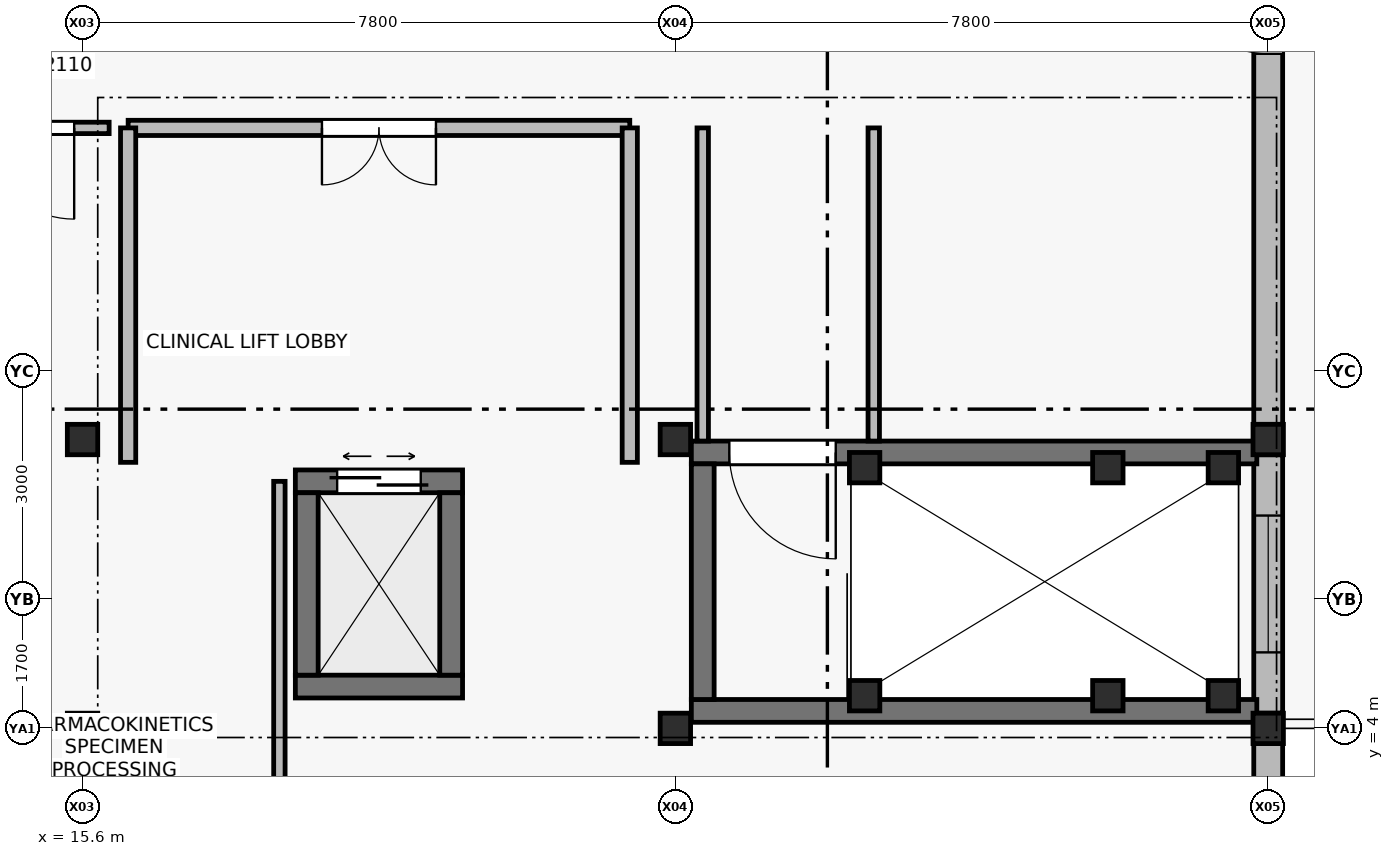
"""IFC4 building model, lengths in metres.
Left out: names, types, materials, properties, quantities, classifications, styles, units other than length and angle.
Written with IfcOpenShell. Run it as: python <this file> out.ifc"""

import sys

from ifc_helpers import new_model, si_unit, direction, frame, frame_2d, origin, origin_2d, place, context, subcontext, project, spatial, rectangle, extrude, element, fill, save


model = new_model("IFC4")
c1 = context("Model", 3, precision=1e-05, world=origin(), true_north=direction((0.0, 1.0)))
c2 = subcontext(c1, "Body", "Model", "MODEL_VIEW")
j1 = project(units=[si_unit("LENGTHUNIT", "METRE"), si_unit("PLANEANGLEUNIT", "RADIAN")], contexts=[c1])
p1 = place(None, origin())
s1 = spatial("IfcSite", under=j1, at=p1, CompositionType="ELEMENT")
p2 = place(p1, origin())
s2 = spatial("IfcBuilding", under=s1, at=p2, CompositionType="ELEMENT")
p3 = place(p2, frame((0.0, 0.0, 18.6)))
s3 = spatial("IfcBuildingStorey", under=s2, at=p3, CompositionType="ELEMENT", Elevation=18.6)
for number, where, z_axis, x_axis in (
    (1, (15.6, 4.0, 0.0), (0.0, 0.0, 1.0), (1.0, 0.0, 0.0)),
    (2, (15.6, 7.8, 0.0), (0.0, 0.0, 1.0), (1.0, 0.0, 0.0)),
    (3, (23.4, 4.0, 0.0), (0.0, 0.0, 1.0), (1.0, 0.0, 0.0)),
    (4, (23.4, 7.8, 0.0), (0.0, 0.0, 1.0), (1.0, 0.0, 0.0)),
    (5, (31.2, 4.0, 0.0), (0.0, 0.0, 1.0), (1.0, 0.0, 0.0)),
    (6, (31.2, 7.8, 0.0), (0.0, 0.0, 1.0), (1.0, 0.0, 0.0)),
    (7, (25.89, 4.43, 0.0), (0.0, 0.0, 1.0), (1.0, 0.0, 0.0)),
    (8, (25.89, 7.43, 0.0), (0.0, 0.0, 1.0), (1.0, 0.0, 0.0)),
    (9, (29.09, 4.43, 0.0), (0.0, 0.0, 1.0), (1.0, 0.0, 0.0)),
    (10, (29.09, 7.43, 0.0), (0.0, 0.0, 1.0), (1.0, 0.0, 0.0)),
    (11, (30.61, 4.43, 0.0), (0.0, 0.0, 1.0), (1.0, 0.0, 0.0)),
    (12, (30.61, 7.43, 0.0), (0.0, 0.0, 1.0), (1.0, 0.0, 0.0)),
):
    element("IfcColumn", number, at=place(p3, frame(where, z_axis=z_axis, x_axis=x_axis)), inside=s3, PredefinedType="COLUMN", context=c2, shape_type="SweptSolid", body=[
        extrude(rectangle(XDim=0.4, YDim=0.4, at=origin_2d()), origin(), (0.0, 0.0, 1.0), 4.5),
    ])
p4 = place(p3, frame((31.2, 3.8, 0.0), z_axis=(0.0, 0.0, 1.0), x_axis=(0.0, -1.0, 0.0)))
e13 = element("IfcWall", 13, at=p4, inside=s3, PredefinedType="STANDARD", context=c2, shape_type="SweptSolid", body=[
    extrude(rectangle(XDim=3.6, YDim=0.38, at=frame_2d((1.8, 0.0))), origin(), (0.0, 0.0, 1.0), 3.9),
])
p5 = place(p4, frame((0.975, 0.0, 0.9)))
e14 = element("IfcOpeningElement", 14, at=p5, cuts=e13, PredefinedType="OPENING", context=c2, shape_type="SweptSolid", body=[
    extrude(rectangle(XDim=1.65, YDim=1.85, at=frame_2d((0.825, 0.925))), frame((0.0, 0.2, 0.0), z_axis=(0.0, -1.0, 0.0), x_axis=(1.0, 0.0, 0.0)), (0.0, 0.0, 1.0), 0.4),
])
p6 = place(p3, frame((31.2, 7.6, 0.0), z_axis=(0.0, 0.0, 1.0), x_axis=(0.0, -1.0, 0.0)))
e15 = element("IfcWall", 15, at=p6, inside=s3, PredefinedType="STANDARD", context=c2, shape_type="SweptSolid", body=[
    extrude(rectangle(XDim=3.4, YDim=0.38, at=frame_2d((1.7, 0.0))), origin(), (0.0, 0.0, 1.0), 3.9),
])
p7 = place(p6, frame((0.8, 0.0, 0.9)))
e16 = element("IfcOpeningElement", 16, at=p7, cuts=e15, PredefinedType="OPENING", context=c2, shape_type="SweptSolid", body=[
    extrude(rectangle(XDim=1.8, YDim=1.85, at=frame_2d((0.9, 0.925))), frame((0.0, 0.2, 0.0), z_axis=(0.0, -1.0, 0.0), x_axis=(1.0, 0.0, 0.0)), (0.0, 0.0, 1.0), 0.4),
])
p8 = place(p3, frame((31.2, 15.4, 0.0), z_axis=(0.0, 0.0, 1.0), x_axis=(0.0, -1.0, 0.0)))
e17 = element("IfcWall", 17, at=p8, inside=s3, PredefinedType="STANDARD", context=c2, shape_type="SweptSolid", body=[
    extrude(rectangle(XDim=7.4, YDim=0.38, at=frame_2d((3.7, 0.0))), origin(), (0.0, 0.0, 1.0), 3.9),
])
p9 = place(p8, frame((1.275, 0.0, 0.0)))
e18 = element("IfcOpeningElement", 18, at=p9, cuts=e17, PredefinedType="OPENING", context=c2, shape_type="SweptSolid", body=[
    extrude(rectangle(XDim=1.25, YDim=2.2, at=frame_2d((0.625, 1.1))), frame((0.0, 0.2, 0.0), z_axis=(0.0, -1.0, 0.0), x_axis=(1.0, 0.0, 0.0)), (0.0, 0.0, 1.0), 0.4),
])
p10 = place(p3, frame((23.61, 4.23, 0.0), z_axis=(0.0, 0.0, 1.0), x_axis=(1.0, 0.0, 0.0)))
e19 = element("IfcWall", 19, at=p10, inside=s3, PredefinedType="SHEAR", context=c2, shape_type="SweptSolid", body=[
    extrude(rectangle(XDim=7.44, YDim=0.3, at=frame_2d((3.72, 0.0))), origin(), (0.0, 0.0, 1.0), 4.24),
])
p11 = place(p3, frame((31.05, 7.63, 0.0), z_axis=(0.0, 0.0, 1.0), x_axis=(-1.0, 0.0, 0.0)))
e20 = element("IfcWall", 20, at=p11, inside=s3, PredefinedType="SHEAR", context=c2, shape_type="SweptSolid", body=[
    extrude(rectangle(XDim=7.44, YDim=0.3, at=frame_2d((3.72, 0.0))), origin(), (0.0, 0.0, 1.0), 4.24),
])
p12 = place(p11, frame((5.54, 0.0, 0.0)))
e21 = element("IfcOpeningElement", 21, at=p12, cuts=e20, PredefinedType="OPENING", context=c2, shape_type="SweptSolid", body=[
    extrude(rectangle(XDim=1.4, YDim=2.2, at=frame_2d((0.7, 1.1))), frame((0.0, 0.16, 0.0), z_axis=(0.0, -1.0, 0.0), x_axis=(1.0, 0.0, 0.0)), (0.0, 0.0, 1.0), 0.32),
])
p13 = place(p3, frame((23.76, 7.48, 0.0), z_axis=(0.0, 0.0, 1.0), x_axis=(0.0, -1.0, 0.0)))
e22 = element("IfcWall", 22, at=p13, inside=s3, PredefinedType="SHEAR", context=c2, shape_type="SweptSolid", body=[
    extrude(rectangle(XDim=3.1, YDim=0.3, at=frame_2d((1.55, 0.0))), origin(), (0.0, 0.0, 1.0), 4.24),
])
p14 = place(p3, frame((18.4, 4.55, 0.0), z_axis=(0.0, 0.0, 1.0), x_axis=(1.0, 0.0, 0.0)))
e23 = element("IfcWall", 23, at=p14, inside=s3, PredefinedType="SHEAR", context=c2, shape_type="SweptSolid", body=[
    extrude(rectangle(XDim=2.2, YDim=0.3, at=frame_2d((1.1, 0.0))), origin(), (0.0, 0.0, 1.0), 4.24),
])
p15 = place(p3, frame((20.6, 7.25, 0.0), z_axis=(0.0, 0.0, 1.0), x_axis=(-1.0, 0.0, 0.0)))
e24 = element("IfcWall", 24, at=p15, inside=s3, PredefinedType="SHEAR", context=c2, shape_type="SweptSolid", body=[
    extrude(rectangle(XDim=2.2, YDim=0.3, at=frame_2d((1.1, 0.0))), origin(), (0.0, 0.0, 1.0), 4.24),
])
p16 = place(p15, frame((0.55, 0.0, 0.0)))
e25 = element("IfcOpeningElement", 25, at=p16, cuts=e24, PredefinedType="OPENING", context=c2, shape_type="SweptSolid", body=[
    extrude(rectangle(XDim=1.1, YDim=2.2, at=frame_2d((0.55, 1.1))), frame((0.0, 0.16, 0.0), z_axis=(0.0, -1.0, 0.0), x_axis=(1.0, 0.0, 0.0)), (0.0, 0.0, 1.0), 0.32),
])
for number, where, z_axis, x_axis in (
    (26, (18.55, 7.1, 0.0), (0.0, 0.0, 1.0), (0.0, -1.0, 0.0)),
    (27, (20.45, 4.7, 0.0), (0.0, 0.0, 1.0), (0.0, 1.0, 0.0)),
):
    element("IfcWall", number, at=place(p3, frame(where, z_axis=z_axis, x_axis=x_axis)), inside=s3, PredefinedType="SHEAR", context=c2, shape_type="SweptSolid", body=[
        extrude(rectangle(XDim=2.4, YDim=0.3, at=frame_2d((1.2, 0.0))), origin(), (0.0, 0.0, 1.0), 4.24),
    ])
p17 = place(p3, frame((22.8, 11.9, 0.0), z_axis=(0.0, 0.0, 1.0), x_axis=(-1.0, 0.0, 0.0)))
e28 = element("IfcWall", 28, at=p17, inside=s3, PredefinedType="SOLIDWALL", context=c2, shape_type="SweptSolid", body=[
    extrude(rectangle(XDim=6.6, YDim=0.2, at=frame_2d((3.3, 0.0))), origin(), (0.0, 0.0, 1.0), 4.24),
])
p18 = place(p17, frame((2.55, 0.0, 0.0)))
e29 = element("IfcOpeningElement", 29, at=p18, cuts=e28, PredefinedType="OPENING", context=c2, shape_type="SweptSolid", body=[
    extrude(rectangle(XDim=1.5, YDim=2.2, at=frame_2d((0.75, 1.1))), frame((0.0, 0.11, 0.0), z_axis=(0.0, -1.0, 0.0), x_axis=(1.0, 0.0, 0.0)), (0.0, 0.0, 1.0), 0.22),
])
for number, where, z_axis, x_axis in (
    (30, (16.2, 11.9, 0.0), (0.0, 0.0, 1.0), (0.0, -1.0, 0.0)),
    (31, (22.8, 7.5, 0.0), (0.0, 0.0, 1.0), (0.0, 1.0, 0.0)),
):
    element("IfcWall", number, at=place(p3, frame(where, z_axis=z_axis, x_axis=x_axis)), inside=s3, PredefinedType="SOLIDWALL", context=c2, shape_type="SweptSolid", body=[
        extrude(rectangle(XDim=4.4, YDim=0.2, at=frame_2d((2.2, 0.0))), origin(), (0.0, 0.0, 1.0), 4.24),
    ])
for number, where, z_axis, x_axis in (
    (32, (23.76, 7.78, 0.0), (0.0, 0.0, 1.0), (0.0, 1.0, 0.0)),
    (33, (26.01, 7.78, 0.0), (0.0, 0.0, 1.0), (0.0, 1.0, 0.0)),
):
    element("IfcWall", number, at=place(p3, frame(where, z_axis=z_axis, x_axis=x_axis)), inside=s3, PredefinedType="PARTITIONING", context=c2, shape_type="SweptSolid", body=[
        extrude(rectangle(XDim=4.12, YDim=0.15, at=frame_2d((2.06, 0.0))), origin(), (0.0, 0.0, 1.0), 4.24),
    ])
p19 = place(p3, frame((15.95, 11.9, 0.0), z_axis=(0.0, 0.0, 1.0), x_axis=(-1.0, 0.0, 0.0)))
e34 = element("IfcWall", 34, at=p19, inside=s3, PredefinedType="PARTITIONING", context=c2, shape_type="SweptSolid", body=[
    extrude(rectangle(XDim=2.11, YDim=0.15, at=frame_2d((1.055, 0.0))), origin(), (0.0, 0.0, 1.0), 4.24),
])
p20 = place(p19, frame((0.46, 0.0, 0.0)))
e35 = element("IfcOpeningElement", 35, at=p20, cuts=e34, PredefinedType="OPENING", context=c2, shape_type="SweptSolid", body=[
    extrude(rectangle(XDim=1.2, YDim=2.2, at=frame_2d((0.6, 1.1))), frame((0.0, 0.085, 0.0), z_axis=(0.0, -1.0, 0.0), x_axis=(1.0, 0.0, 0.0)), (0.0, 0.0, 1.0), 0.17),
])
p21 = place(p3, frame((18.19, 0.19, 0.0), z_axis=(0.0, 0.0, 1.0), x_axis=(0.0, 1.0, 0.0)))
e36 = element("IfcWall", 36, at=p21, inside=s3, PredefinedType="PARTITIONING", context=c2, shape_type="SweptSolid", body=[
    extrude(rectangle(XDim=7.06, YDim=0.15, at=frame_2d((3.53, 0.0))), origin(), (0.0, 0.0, 1.0), 4.24),
])
p22 = place(p7, origin())
e37 = element("IfcWindow", 37, at=p22, inside=s3, PartitioningType="SINGLE_PANEL", PredefinedType="WINDOW", context=c2, shape_type="SweptSolid", body=[
    extrude(rectangle(XDim=1.8, YDim=1.85, at=frame_2d((0.9, 0.925))), frame((0.0, 0.03, 0.0), z_axis=(0.0, -1.0, 0.0), x_axis=(1.0, 0.0, 0.0)), (0.0, 0.0, 1.0), 0.06),
])
fill(e16, e37)
p23 = place(p9, frame((1.25, 0.0, 0.0), z_axis=(0.0, 0.0, 1.0), x_axis=(-1.0, 0.0, 0.0)))
e38 = element("IfcDoor", 38, at=p23, inside=s3, OperationType="SINGLE_SWING_LEFT", PredefinedType="DOOR", context=c2, shape_type="SweptSolid", body=[
    extrude(rectangle(XDim=1.25, YDim=2.2, at=frame_2d((0.625, 1.1))), frame((0.0, 0.025, 0.0), z_axis=(0.0, -1.0, 0.0), x_axis=(1.0, 0.0, 0.0)), (0.0, 0.0, 1.0), 0.05),
])
fill(e18, e38)
p24 = place(p12, origin())
e39 = element("IfcDoor", 39, at=p24, inside=s3, OperationType="SINGLE_SWING_LEFT", PredefinedType="DOOR", context=c2, shape_type="SweptSolid", body=[
    extrude(rectangle(XDim=1.4, YDim=2.2, at=frame_2d((0.7, 1.1))), frame((0.0, 0.025, 0.0), z_axis=(0.0, -1.0, 0.0), x_axis=(1.0, 0.0, 0.0)), (0.0, 0.0, 1.0), 0.05),
])
fill(e21, e39)
p25 = place(p16, origin())
e40 = element("IfcDoor", 40, at=p25, inside=s3, OperationType="DOUBLE_DOOR_SLIDING", PredefinedType="DOOR", context=c2, shape_type="SweptSolid", body=[
    extrude(rectangle(XDim=1.1, YDim=2.2, at=frame_2d((0.55, 1.1))), frame((0.0, 0.025, 0.0), z_axis=(0.0, -1.0, 0.0), x_axis=(1.0, 0.0, 0.0)), (0.0, 0.0, 1.0), 0.05),
])
fill(e25, e40)
p26 = place(p18, origin())
e41 = element("IfcDoor", 41, at=p26, inside=s3, OperationType="DOUBLE_DOOR_SINGLE_SWING", PredefinedType="DOOR", context=c2, shape_type="SweptSolid", body=[
    extrude(rectangle(XDim=1.5, YDim=2.2, at=frame_2d((0.75, 1.1))), frame((0.0, 0.025, 0.0), z_axis=(0.0, -1.0, 0.0), x_axis=(1.0, 0.0, 0.0)), (0.0, 0.0, 1.0), 0.05),
])
fill(e29, e41)
p27 = place(p20, origin())
e42 = element("IfcDoor", 42, at=p27, inside=s3, OperationType="SINGLE_SWING_LEFT", PredefinedType="DOOR", context=c2, shape_type="SweptSolid", body=[
    extrude(rectangle(XDim=1.2, YDim=2.2, at=frame_2d((0.6, 1.1))), frame((0.0, 0.025, 0.0), z_axis=(0.0, -1.0, 0.0), x_axis=(1.0, 0.0, 0.0)), (0.0, 0.0, 1.0), 0.05),
])
fill(e35, e42)
save(model, sys.argv[1])
